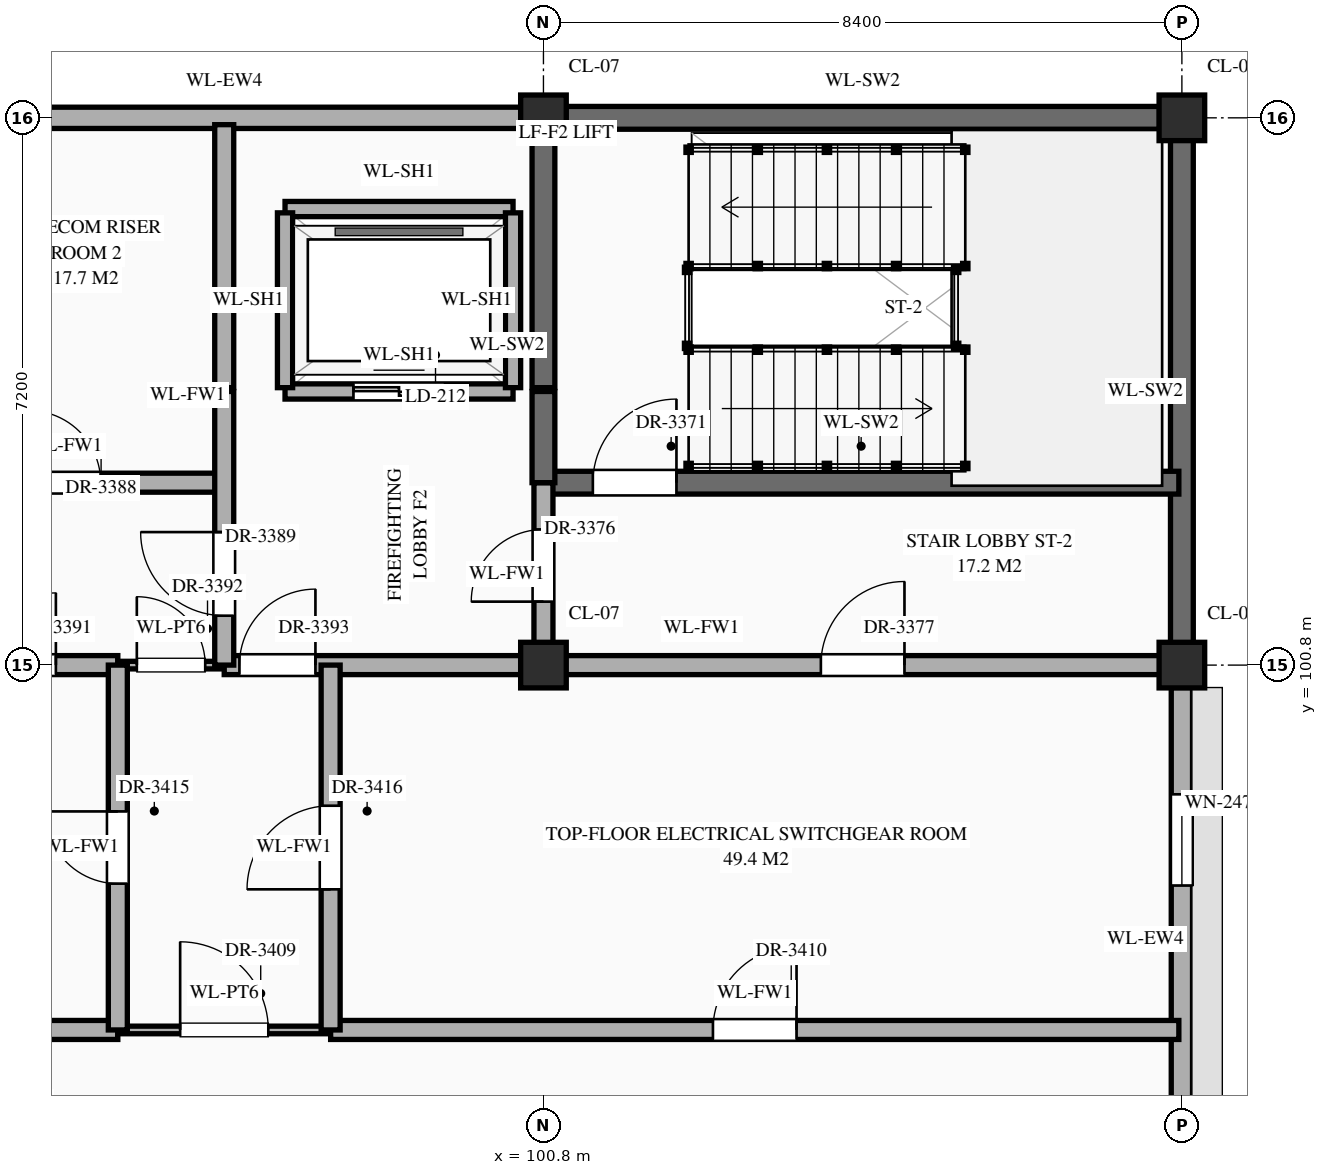
"""IFC4 building model, lengths in metres.
Left out: names, types, materials, properties, quantities, classifications, styles, units other than length and angle.
Written with IfcOpenShell. Run it as: python <this file> out.ifc"""

import sys

from ifc_helpers import new_model, si_unit, direction, frame, frame_2d, origin, origin_2d, place, context, subcontext, project, spatial, rectangle, extrude, element, fill, save


model = new_model("IFC4")
c1 = context("Model", 3, precision=1e-05, world=origin(), true_north=direction((0.0, 1.0)))
c2 = subcontext(c1, "Body", "Model", "MODEL_VIEW")
j1 = project(units=[si_unit("LENGTHUNIT", "METRE"), si_unit("PLANEANGLEUNIT", "RADIAN")], contexts=[c1])
p1 = place(None, origin())
s1 = spatial("IfcSite", under=j1, at=p1, CompositionType="ELEMENT")
p2 = place(p1, origin())
s2 = spatial("IfcBuilding", under=s1, at=p2, CompositionType="ELEMENT")
p3 = place(p2, frame((0.0, 0.0, 68.7)))
s3 = spatial("IfcBuildingStorey", under=s2, at=p3, CompositionType="ELEMENT", Elevation=68.7)
for number, where, z_axis, x_axis in (
    (1, (100.8, 100.8, 0.0), (0.0, 0.0, 1.0), (1.0, 0.0, 0.0)),
    (2, (100.8, 108.0, 0.0), (0.0, 0.0, 1.0), (1.0, 0.0, 0.0)),
    (3, (109.2, 100.8, 0.0), (0.0, 0.0, 1.0), (1.0, 0.0, 0.0)),
    (4, (109.2, 108.0, 0.0), (0.0, 0.0, 1.0), (1.0, 0.0, 0.0)),
):
    element("IfcColumn", number, at=place(p3, frame(where, z_axis=z_axis, x_axis=x_axis)), inside=s3, PredefinedType="COLUMN", context=c2, shape_type="SweptSolid", body=[
        extrude(rectangle(XDim=0.6, YDim=0.6, at=origin_2d()), origin(), (0.0, 0.0, 1.0), 4.5),
    ])
p4 = place(p3, frame((92.695, 108.0, 0.0), z_axis=(0.0, 0.0, 1.0), x_axis=(1.0, 0.0, 0.0)))
e5 = element("IfcWall", 5, at=p4, inside=s3, PredefinedType="STANDARD", context=c2, shape_type="SweptSolid", body=[
    extrude(rectangle(XDim=7.81, YDim=0.28, at=frame_2d((3.905, 0.0))), origin(), (0.0, 0.0, 1.0), 3.47),
])
p5 = place(p3, frame((109.2, 93.895, 0.0), z_axis=(0.0, 0.0, 1.0), x_axis=(0.0, 1.0, 0.0)))
e6 = element("IfcWall", 6, at=p5, inside=s3, PredefinedType="STANDARD", context=c2, shape_type="SweptSolid", body=[
    extrude(rectangle(XDim=6.61, YDim=0.28, at=frame_2d((3.305, 0.0))), origin(), (0.0, 0.0, 1.0), 3.47),
])
p6 = place(p5, frame((4.005, 0.0, 0.85)))
e7 = element("IfcOpeningElement", 7, at=p6, cuts=e6, PredefinedType="OPENING", context=c2, shape_type="SweptSolid", body=[
    extrude(rectangle(XDim=1.2, YDim=1.92, at=frame_2d((0.6, 0.96))), frame((0.0, 0.152, 0.0), z_axis=(0.0, -1.0, 0.0), x_axis=(1.0, 0.0, 0.0)), (0.0, 0.0, 1.0), 0.304),
])
p7 = place(p3, frame((101.095, 108.0, 0.0), z_axis=(0.0, 0.0, 1.0), x_axis=(1.0, 0.0, 0.0)))
e8 = element("IfcWall", 8, at=p7, inside=s3, PredefinedType="SHEAR", context=c2, shape_type="SweptSolid", body=[
    extrude(rectangle(XDim=7.81, YDim=0.3, at=frame_2d((3.905, 0.0))), origin(), (0.0, 0.0, 1.0), 4.12),
])
p8 = place(p3, frame((109.2, 101.095, 0.0), z_axis=(0.0, 0.0, 1.0), x_axis=(0.0, 1.0, 0.0)))
e9 = element("IfcWall", 9, at=p8, inside=s3, PredefinedType="SHEAR", context=c2, shape_type="SweptSolid", body=[
    extrude(rectangle(XDim=6.61, YDim=0.3, at=frame_2d((3.305, 0.0))), origin(), (0.0, 0.0, 1.0), 4.12),
])
p9 = place(p3, frame((72.8, 96.0, 0.0), z_axis=(0.0, 0.0, 1.0), x_axis=(1.0, 0.0, 0.0)))
e10 = element("IfcWall", 10, at=p9, inside=s3, PredefinedType="STANDARD", context=c2, shape_type="SweptSolid", body=[
    extrude(rectangle(XDim=22.4, YDim=0.25, at=frame_2d((11.2, 0.0))), origin(), (0.0, 0.0, 1.0), 4.12),
])
p10 = place(p9, frame((5.125, 0.0, 0.0)))
e11 = element("IfcOpeningElement", 11, at=p10, cuts=e10, PredefinedType="OPENING", context=c2, shape_type="SweptSolid", body=[
    extrude(rectangle(XDim=0.95, YDim=2.15, at=frame_2d((0.475, 1.075))), frame((0.0, 0.137, 0.0), z_axis=(0.0, -1.0, 0.0), x_axis=(1.0, 0.0, 0.0)), (0.0, 0.0, 1.0), 0.274),
])
p11 = place(p9, frame((16.3, 0.0, 0.0)))
e12 = element("IfcOpeningElement", 12, at=p11, cuts=e10, PredefinedType="OPENING", context=c2, shape_type="SweptSolid", body=[
    extrude(rectangle(XDim=1.0, YDim=2.2, at=frame_2d((0.5, 1.1))), frame((0.0, 0.137, 0.0), z_axis=(0.0, -1.0, 0.0), x_axis=(1.0, 0.0, 0.0)), (0.0, 0.0, 1.0), 0.274),
])
p12 = place(p3, frame((95.2, 96.0, 0.0), z_axis=(0.0, 0.0, 1.0), x_axis=(1.0, 0.0, 0.0)))
e13 = element("IfcWall", 13, at=p12, inside=s3, PredefinedType="STANDARD", context=c2, shape_type="SweptSolid", body=[
    extrude(rectangle(XDim=2.8, YDim=0.1, at=frame_2d((1.4, 0.0))), origin(), (0.0, 0.0, 1.0), 4.12),
])
p13 = place(p12, frame((0.82, 0.0, 0.0)))
e14 = element("IfcOpeningElement", 14, at=p13, cuts=e13, PredefinedType="OPENING", context=c2, shape_type="SweptSolid", body=[
    extrude(rectangle(XDim=1.16, YDim=2.3, at=frame_2d((0.58, 1.15))), frame((0.0, 0.062, 0.0), z_axis=(0.0, -1.0, 0.0), x_axis=(1.0, 0.0, 0.0)), (0.0, 0.0, 1.0), 0.124),
])
p14 = place(p3, frame((98.0, 96.0, 0.0), z_axis=(0.0, 0.0, 1.0), x_axis=(1.0, 0.0, 0.0)))
e15 = element("IfcWall", 15, at=p14, inside=s3, PredefinedType="STANDARD", context=c2, shape_type="SweptSolid", body=[
    extrude(rectangle(XDim=11.16, YDim=0.25, at=frame_2d((5.58, 0.0))), origin(), (0.0, 0.0, 1.0), 4.12),
])
p15 = place(p14, frame((5.03, 0.0, 0.0)))
e16 = element("IfcOpeningElement", 16, at=p15, cuts=e15, PredefinedType="OPENING", context=c2, shape_type="SweptSolid", body=[
    extrude(rectangle(XDim=1.1, YDim=2.2, at=frame_2d((0.55, 1.1))), frame((0.0, 0.137, 0.0), z_axis=(0.0, -1.0, 0.0), x_axis=(1.0, 0.0, 0.0)), (0.0, 0.0, 1.0), 0.274),
])
p16 = place(p3, frame((72.8, 100.8, 0.0), z_axis=(0.0, 0.0, 1.0), x_axis=(1.0, 0.0, 0.0)))
e17 = element("IfcWall", 17, at=p16, inside=s3, PredefinedType="STANDARD", context=c2, shape_type="SweptSolid", body=[
    extrude(rectangle(XDim=22.4, YDim=0.25, at=frame_2d((11.2, 0.0))), origin(), (0.0, 0.0, 1.0), 3.27),
])
p17 = place(p16, frame((0.79, 0.0, 0.0)))
e18 = element("IfcOpeningElement", 18, at=p17, cuts=e17, PredefinedType="OPENING", context=c2, shape_type="SweptSolid", body=[
    extrude(rectangle(XDim=1.0, YDim=2.2, at=frame_2d((0.5, 1.1))), frame((0.0, 0.137, 0.0), z_axis=(0.0, -1.0, 0.0), x_axis=(1.0, 0.0, 0.0)), (0.0, 0.0, 1.0), 0.274),
])
p18 = place(p16, frame((20.635, 0.0, 0.0)))
e19 = element("IfcOpeningElement", 19, at=p18, cuts=e17, PredefinedType="OPENING", context=c2, shape_type="SweptSolid", body=[
    extrude(rectangle(XDim=0.95, YDim=2.15, at=frame_2d((0.475, 1.075))), frame((0.0, 0.137, 0.0), z_axis=(0.0, -1.0, 0.0), x_axis=(1.0, 0.0, 0.0)), (0.0, 0.0, 1.0), 0.274),
])
p19 = place(p16, frame((6.45, 0.0, 0.0)))
e20 = element("IfcOpeningElement", 20, at=p19, cuts=e17, PredefinedType="OPENING", context=c2, shape_type="SweptSolid", body=[
    extrude(rectangle(XDim=1.1, YDim=2.2, at=frame_2d((0.55, 1.1))), frame((0.0, 0.137, 0.0), z_axis=(0.0, -1.0, 0.0), x_axis=(1.0, 0.0, 0.0)), (0.0, 0.0, 1.0), 0.274),
])
p20 = place(p16, frame((14.9, 0.0, 0.0)))
e21 = element("IfcOpeningElement", 21, at=p20, cuts=e17, PredefinedType="OPENING", context=c2, shape_type="SweptSolid", body=[
    extrude(rectangle(XDim=1.0, YDim=2.2, at=frame_2d((0.5, 1.1))), frame((0.0, 0.137, 0.0), z_axis=(0.0, -1.0, 0.0), x_axis=(1.0, 0.0, 0.0)), (0.0, 0.0, 1.0), 0.274),
])
p21 = place(p3, frame((95.2, 100.8, 0.0), z_axis=(0.0, 0.0, 1.0), x_axis=(1.0, 0.0, 0.0)))
e22 = element("IfcWall", 22, at=p21, inside=s3, PredefinedType="STANDARD", context=c2, shape_type="SweptSolid", body=[
    extrude(rectangle(XDim=1.4, YDim=0.1, at=frame_2d((0.7, 0.0))), origin(), (0.0, 0.0, 1.0), 3.27),
])
p22 = place(p21, frame((0.25, 0.0, 0.0)))
e23 = element("IfcOpeningElement", 23, at=p22, cuts=e22, PredefinedType="OPENING", context=c2, shape_type="SweptSolid", body=[
    extrude(rectangle(XDim=0.9, YDim=2.15, at=frame_2d((0.45, 1.075))), frame((0.0, 0.062, 0.0), z_axis=(0.0, -1.0, 0.0), x_axis=(1.0, 0.0, 0.0)), (0.0, 0.0, 1.0), 0.124),
])
p23 = place(p3, frame((96.6, 100.8, 0.0), z_axis=(0.0, 0.0, 1.0), x_axis=(1.0, 0.0, 0.0)))
e24 = element("IfcWall", 24, at=p23, inside=s3, PredefinedType="STANDARD", context=c2, shape_type="SweptSolid", body=[
    extrude(rectangle(XDim=12.56, YDim=0.25, at=frame_2d((6.28, 0.0))), origin(), (0.0, 0.0, 1.0), 3.27),
])
p24 = place(p23, frame((7.85, 0.0, 0.0)))
e25 = element("IfcOpeningElement", 25, at=p24, cuts=e24, PredefinedType="OPENING", context=c2, shape_type="SweptSolid", body=[
    extrude(rectangle(XDim=1.1, YDim=2.2, at=frame_2d((0.55, 1.1))), frame((0.0, 0.137, 0.0), z_axis=(0.0, -1.0, 0.0), x_axis=(1.0, 0.0, 0.0)), (0.0, 0.0, 1.0), 0.274),
])
p25 = place(p23, frame((0.2, 0.0, 0.0)))
e26 = element("IfcOpeningElement", 26, at=p25, cuts=e24, PredefinedType="OPENING", context=c2, shape_type="SweptSolid", body=[
    extrude(rectangle(XDim=1.0, YDim=2.2, at=frame_2d((0.5, 1.1))), frame((0.0, 0.137, 0.0), z_axis=(0.0, -1.0, 0.0), x_axis=(1.0, 0.0, 0.0)), (0.0, 0.0, 1.0), 0.274),
])
p26 = place(p3, frame((92.4, 103.2, 0.0), z_axis=(0.0, 0.0, 1.0), x_axis=(1.0, 0.0, 0.0)))
e27 = element("IfcWall", 27, at=p26, inside=s3, PredefinedType="STANDARD", context=c2, shape_type="SweptSolid", body=[
    extrude(rectangle(XDim=4.2, YDim=0.25, at=frame_2d((2.1, 0.0))), origin(), (0.0, 0.0, 1.0), 4.12),
])
p27 = place(p26, frame((1.625, 0.0, 0.0)))
e28 = element("IfcOpeningElement", 28, at=p27, cuts=e27, PredefinedType="OPENING", context=c2, shape_type="SweptSolid", body=[
    extrude(rectangle(XDim=0.95, YDim=2.15, at=frame_2d((0.475, 1.075))), frame((0.0, 0.137, 0.0), z_axis=(0.0, -1.0, 0.0), x_axis=(1.0, 0.0, 0.0)), (0.0, 0.0, 1.0), 0.274),
])
p28 = place(p3, frame((100.8, 103.2, 0.0), z_axis=(0.0, 0.0, 1.0), x_axis=(1.0, 0.0, 0.0)))
e29 = element("IfcWall", 29, at=p28, inside=s3, PredefinedType="SHEAR", context=c2, shape_type="SweptSolid", body=[
    extrude(rectangle(XDim=8.36, YDim=0.3, at=frame_2d((4.18, 0.0))), origin(), (0.0, 0.0, 1.0), 4.12),
])
p29 = place(p28, frame((0.65, 0.0, 0.0)))
e30 = element("IfcOpeningElement", 30, at=p29, cuts=e29, PredefinedType="OPENING", context=c2, shape_type="SweptSolid", body=[
    extrude(rectangle(XDim=1.1, YDim=2.2, at=frame_2d((0.55, 1.1))), frame((0.0, 0.162, 0.0), z_axis=(0.0, -1.0, 0.0), x_axis=(1.0, 0.0, 0.0)), (0.0, 0.0, 1.0), 0.324),
])
p30 = place(p3, frame((97.4, 104.4, 0.0), z_axis=(0.0, 0.0, 1.0), x_axis=(1.0, 0.0, 0.0)))
e31 = element("IfcWall", 31, at=p30, inside=s3, PredefinedType="STANDARD", context=c2, shape_type="SweptSolid", body=[
    extrude(rectangle(XDim=3.0, YDim=0.2, at=frame_2d((1.5, 0.0))), origin(), (0.0, 0.0, 1.0), 4.12),
])
p31 = place(p30, frame((0.9, 0.0, 0.0)))
e32 = element("IfcOpeningElement", 32, at=p31, cuts=e31, PredefinedType="OPENING", context=c2, shape_type="SweptSolid", body=[
    extrude(rectangle(XDim=1.2, YDim=2.15, at=frame_2d((0.6, 1.075))), frame((0.0, 0.112, 0.0), z_axis=(0.0, -1.0, 0.0), x_axis=(1.0, 0.0, 0.0)), (0.0, 0.0, 1.0), 0.224),
])
p32 = place(p3, frame((97.4, 106.8, 0.0), z_axis=(0.0, 0.0, 1.0), x_axis=(1.0, 0.0, 0.0)))
e33 = element("IfcWall", 33, at=p32, inside=s3, PredefinedType="STANDARD", context=c2, shape_type="SweptSolid", body=[
    extrude(rectangle(XDim=3.0, YDim=0.2, at=frame_2d((1.5, 0.0))), origin(), (0.0, 0.0, 1.0), 4.12),
])
p33 = place(p3, frame((95.2, 96.0, 0.0), z_axis=(0.0, 0.0, 1.0), x_axis=(0.0, 1.0, 0.0)))
e34 = element("IfcWall", 34, at=p33, inside=s3, PredefinedType="STANDARD", context=c2, shape_type="SweptSolid", body=[
    extrude(rectangle(XDim=4.8, YDim=0.25, at=frame_2d((2.4, 0.0))), origin(), (0.0, 0.0, 1.0), 4.12),
])
p34 = place(p33, frame((1.925, 0.0, 0.0)))
e35 = element("IfcOpeningElement", 35, at=p34, cuts=e34, PredefinedType="OPENING", context=c2, shape_type="SweptSolid", body=[
    extrude(rectangle(XDim=0.95, YDim=2.15, at=frame_2d((0.475, 1.075))), frame((0.0, 0.137, 0.0), z_axis=(0.0, -1.0, 0.0), x_axis=(1.0, 0.0, 0.0)), (0.0, 0.0, 1.0), 0.274),
])
p35 = place(p3, frame((96.6, 100.8, 0.0), z_axis=(0.0, 0.0, 1.0), x_axis=(0.0, 1.0, 0.0)))
e36 = element("IfcWall", 36, at=p35, inside=s3, PredefinedType="STANDARD", context=c2, shape_type="SweptSolid", body=[
    extrude(rectangle(XDim=3.6, YDim=0.25, at=frame_2d((1.8, 0.0))), origin(), (0.0, 0.0, 1.0), 4.12),
])
p36 = place(p35, frame((0.65, 0.0, 0.0)))
e37 = element("IfcOpeningElement", 37, at=p36, cuts=e36, PredefinedType="OPENING", context=c2, shape_type="SweptSolid", body=[
    extrude(rectangle(XDim=1.1, YDim=2.2, at=frame_2d((0.55, 1.1))), frame((0.0, 0.137, 0.0), z_axis=(0.0, -1.0, 0.0), x_axis=(1.0, 0.0, 0.0)), (0.0, 0.0, 1.0), 0.274),
])
p37 = place(p3, frame((96.6, 104.45, 0.0), z_axis=(0.0, 0.0, 1.0), x_axis=(0.0, 1.0, 0.0)))
e38 = element("IfcWall", 38, at=p37, inside=s3, PredefinedType="STANDARD", context=c2, shape_type="SweptSolid", body=[
    extrude(rectangle(XDim=3.46, YDim=0.25, at=frame_2d((1.73, 0.0))), origin(), (0.0, 0.0, 1.0), 4.12),
])
p38 = place(p3, frame((97.4, 104.45, 0.0), z_axis=(0.0, 0.0, 1.0), x_axis=(0.0, 1.0, 0.0)))
e39 = element("IfcWall", 39, at=p38, inside=s3, PredefinedType="STANDARD", context=c2, shape_type="SweptSolid", body=[
    extrude(rectangle(XDim=2.3, YDim=0.2, at=frame_2d((1.15, 0.0))), origin(), (0.0, 0.0, 1.0), 4.12),
])
p39 = place(p3, frame((98.0, 96.0, 0.0), z_axis=(0.0, 0.0, 1.0), x_axis=(0.0, 1.0, 0.0)))
e40 = element("IfcWall", 40, at=p39, inside=s3, PredefinedType="STANDARD", context=c2, shape_type="SweptSolid", body=[
    extrude(rectangle(XDim=4.8, YDim=0.25, at=frame_2d((2.4, 0.0))), origin(), (0.0, 0.0, 1.0), 4.12),
])
p40 = place(p39, frame((1.85, 0.0, 0.0)))
e41 = element("IfcOpeningElement", 41, at=p40, cuts=e40, PredefinedType="OPENING", context=c2, shape_type="SweptSolid", body=[
    extrude(rectangle(XDim=1.1, YDim=2.2, at=frame_2d((0.55, 1.1))), frame((0.0, 0.137, 0.0), z_axis=(0.0, -1.0, 0.0), x_axis=(1.0, 0.0, 0.0)), (0.0, 0.0, 1.0), 0.274),
])
p41 = place(p3, frame((100.4, 104.45, 0.0), z_axis=(0.0, 0.0, 1.0), x_axis=(0.0, 1.0, 0.0)))
e42 = element("IfcWall", 42, at=p41, inside=s3, PredefinedType="STANDARD", context=c2, shape_type="SweptSolid", body=[
    extrude(rectangle(XDim=2.3, YDim=0.2, at=frame_2d((1.15, 0.0))), origin(), (0.0, 0.0, 1.0), 4.12),
])
p42 = place(p3, frame((100.8, 100.8, 0.0), z_axis=(0.0, 0.0, 1.0), x_axis=(0.0, 1.0, 0.0)))
e43 = element("IfcWall", 43, at=p42, inside=s3, PredefinedType="STANDARD", context=c2, shape_type="SweptSolid", body=[
    extrude(rectangle(XDim=2.4, YDim=0.25, at=frame_2d((1.2, 0.0))), origin(), (0.0, 0.0, 1.0), 3.37),
])
p43 = place(p42, frame((0.835, 0.0, 0.0)))
e44 = element("IfcOpeningElement", 44, at=p43, cuts=e43, PredefinedType="OPENING", context=c2, shape_type="SweptSolid", body=[
    extrude(rectangle(XDim=0.95, YDim=2.15, at=frame_2d((0.475, 1.075))), frame((0.0, 0.137, 0.0), z_axis=(0.0, -1.0, 0.0), x_axis=(1.0, 0.0, 0.0)), (0.0, 0.0, 1.0), 0.274),
])
p44 = place(p3, frame((100.8, 103.2, 0.0), z_axis=(0.0, 0.0, 1.0), x_axis=(0.0, 1.0, 0.0)))
e45 = element("IfcWall", 45, at=p44, inside=s3, PredefinedType="SHEAR", context=c2, shape_type="SweptSolid", body=[
    extrude(rectangle(XDim=1.2, YDim=0.3, at=frame_2d((0.6, 0.0))), origin(), (0.0, 0.0, 1.0), 4.12),
])
p45 = place(p3, frame((100.8, 104.45, 0.0), z_axis=(0.0, 0.0, 1.0), x_axis=(0.0, 1.0, 0.0)))
e46 = element("IfcWall", 46, at=p45, inside=s3, PredefinedType="SHEAR", context=c2, shape_type="SweptSolid", body=[
    extrude(rectangle(XDim=3.46, YDim=0.3, at=frame_2d((1.73, 0.0))), origin(), (0.0, 0.0, 1.0), 4.12),
])
p46 = place(p6, origin())
e47 = element("IfcWindow", 47, at=p46, inside=s3, PartitioningType="SINGLE_PANEL", PredefinedType="WINDOW", context=c2, shape_type="SweptSolid", body=[
    extrude(rectangle(XDim=1.2, YDim=1.92, at=frame_2d((0.6, 0.96))), frame((0.0, 0.03, 0.0), z_axis=(0.0, -1.0, 0.0), x_axis=(1.0, 0.0, 0.0)), (0.0, 0.0, 1.0), 0.06),
])
fill(e7, e47)
p47 = place(p31, origin())
e48 = element("IfcDoor", 48, at=p47, inside=s3, OperationType="DOUBLE_DOOR_SLIDING", PredefinedType="DOOR", context=c2, shape_type="SweptSolid", body=[
    extrude(rectangle(XDim=1.2, YDim=2.15, at=frame_2d((0.6, 1.075))), frame((0.0, 0.025, 0.0), z_axis=(0.0, -1.0, 0.0), x_axis=(1.0, 0.0, 0.0)), (0.0, 0.0, 1.0), 0.05),
])
fill(e32, e48)
p48 = place(p29, origin())
e49 = element("IfcDoor", 49, at=p48, inside=s3, OperationType="SINGLE_SWING_RIGHT", PredefinedType="DOOR", context=c2, shape_type="SweptSolid", body=[
    extrude(rectangle(XDim=1.1, YDim=2.2, at=frame_2d((0.55, 1.1))), frame((0.0, 0.025, 0.0), z_axis=(0.0, -1.0, 0.0), x_axis=(1.0, 0.0, 0.0)), (0.0, 0.0, 1.0), 0.05),
])
fill(e30, e49)
p49 = place(p43, origin())
e50 = element("IfcDoor", 50, at=p49, inside=s3, OperationType="SINGLE_SWING_LEFT", PredefinedType="DOOR", context=c2, shape_type="SweptSolid", body=[
    extrude(rectangle(XDim=0.95, YDim=2.15, at=frame_2d((0.475, 1.075))), frame((0.0, 0.025, 0.0), z_axis=(0.0, -1.0, 0.0), x_axis=(1.0, 0.0, 0.0)), (0.0, 0.0, 1.0), 0.05),
])
fill(e44, e50)
p50 = place(p24, origin())
e51 = element("IfcDoor", 51, at=p50, inside=s3, OperationType="SINGLE_SWING_RIGHT", PredefinedType="DOOR", context=c2, shape_type="SweptSolid", body=[
    extrude(rectangle(XDim=1.1, YDim=2.2, at=frame_2d((0.55, 1.1))), frame((0.0, 0.025, 0.0), z_axis=(0.0, -1.0, 0.0), x_axis=(1.0, 0.0, 0.0)), (0.0, 0.0, 1.0), 0.05),
])
fill(e25, e51)
p51 = place(p27, origin())
e52 = element("IfcDoor", 52, at=p51, inside=s3, OperationType="SINGLE_SWING_LEFT", PredefinedType="DOOR", context=c2, shape_type="SweptSolid", body=[
    extrude(rectangle(XDim=0.95, YDim=2.15, at=frame_2d((0.475, 1.075))), frame((0.0, 0.025, 0.0), z_axis=(0.0, -1.0, 0.0), x_axis=(1.0, 0.0, 0.0)), (0.0, 0.0, 1.0), 0.05),
])
fill(e28, e52)
p52 = place(p36, origin())
e53 = element("IfcDoor", 53, at=p52, inside=s3, OperationType="SINGLE_SWING_RIGHT", PredefinedType="DOOR", context=c2, shape_type="SweptSolid", body=[
    extrude(rectangle(XDim=1.1, YDim=2.2, at=frame_2d((0.55, 1.1))), frame((0.0, 0.025, 0.0), z_axis=(0.0, -1.0, 0.0), x_axis=(1.0, 0.0, 0.0)), (0.0, 0.0, 1.0), 0.05),
])
fill(e37, e53)
p53 = place(p18, origin())
e54 = element("IfcDoor", 54, at=p53, inside=s3, OperationType="SINGLE_SWING_RIGHT", PredefinedType="DOOR", context=c2, shape_type="SweptSolid", body=[
    extrude(rectangle(XDim=0.95, YDim=2.15, at=frame_2d((0.475, 1.075))), frame((0.0, 0.025, 0.0), z_axis=(0.0, -1.0, 0.0), x_axis=(1.0, 0.0, 0.0)), (0.0, 0.0, 1.0), 0.05),
])
fill(e19, e54)
p54 = place(p22, origin())
e55 = element("IfcDoor", 55, at=p54, inside=s3, OperationType="SINGLE_SWING_LEFT", PredefinedType="DOOR", context=c2, shape_type="SweptSolid", body=[
    extrude(rectangle(XDim=0.9, YDim=2.15, at=frame_2d((0.45, 1.075))), frame((0.0, 0.025, 0.0), z_axis=(0.0, -1.0, 0.0), x_axis=(1.0, 0.0, 0.0)), (0.0, 0.0, 1.0), 0.05),
])
fill(e23, e55)
p55 = place(p25, origin())
e56 = element("IfcDoor", 56, at=p55, inside=s3, OperationType="SINGLE_SWING_RIGHT", PredefinedType="DOOR", context=c2, shape_type="SweptSolid", body=[
    extrude(rectangle(XDim=1.0, YDim=2.2, at=frame_2d((0.5, 1.1))), frame((0.0, 0.025, 0.0), z_axis=(0.0, -1.0, 0.0), x_axis=(1.0, 0.0, 0.0)), (0.0, 0.0, 1.0), 0.05),
])
fill(e26, e56)
p56 = place(p13, origin())
e57 = element("IfcDoor", 57, at=p56, inside=s3, OperationType="SINGLE_SWING_LEFT", PredefinedType="DOOR", context=c2, shape_type="SweptSolid", body=[
    extrude(rectangle(XDim=1.16, YDim=2.3, at=frame_2d((0.58, 1.15))), frame((0.0, 0.025, 0.0), z_axis=(0.0, -1.0, 0.0), x_axis=(1.0, 0.0, 0.0)), (0.0, 0.0, 1.0), 0.05),
])
fill(e14, e57)
p57 = place(p15, origin())
e58 = element("IfcDoor", 58, at=p57, inside=s3, OperationType="SINGLE_SWING_RIGHT", PredefinedType="DOOR", context=c2, shape_type="SweptSolid", body=[
    extrude(rectangle(XDim=1.1, YDim=2.2, at=frame_2d((0.55, 1.1))), frame((0.0, 0.025, 0.0), z_axis=(0.0, -1.0, 0.0), x_axis=(1.0, 0.0, 0.0)), (0.0, 0.0, 1.0), 0.05),
])
fill(e16, e58)
p58 = place(p34, origin())
e59 = element("IfcDoor", 59, at=p58, inside=s3, OperationType="SINGLE_SWING_RIGHT", PredefinedType="DOOR", context=c2, shape_type="SweptSolid", body=[
    extrude(rectangle(XDim=0.95, YDim=2.15, at=frame_2d((0.475, 1.075))), frame((0.0, 0.025, 0.0), z_axis=(0.0, -1.0, 0.0), x_axis=(1.0, 0.0, 0.0)), (0.0, 0.0, 1.0), 0.05),
])
fill(e35, e59)
p59 = place(p40, origin())
e60 = element("IfcDoor", 60, at=p59, inside=s3, OperationType="SINGLE_SWING_LEFT", PredefinedType="DOOR", context=c2, shape_type="SweptSolid", body=[
    extrude(rectangle(XDim=1.1, YDim=2.2, at=frame_2d((0.55, 1.1))), frame((0.0, 0.025, 0.0), z_axis=(0.0, -1.0, 0.0), x_axis=(1.0, 0.0, 0.0)), (0.0, 0.0, 1.0), 0.05),
])
fill(e41, e60)
save(model, sys.argv[1])
